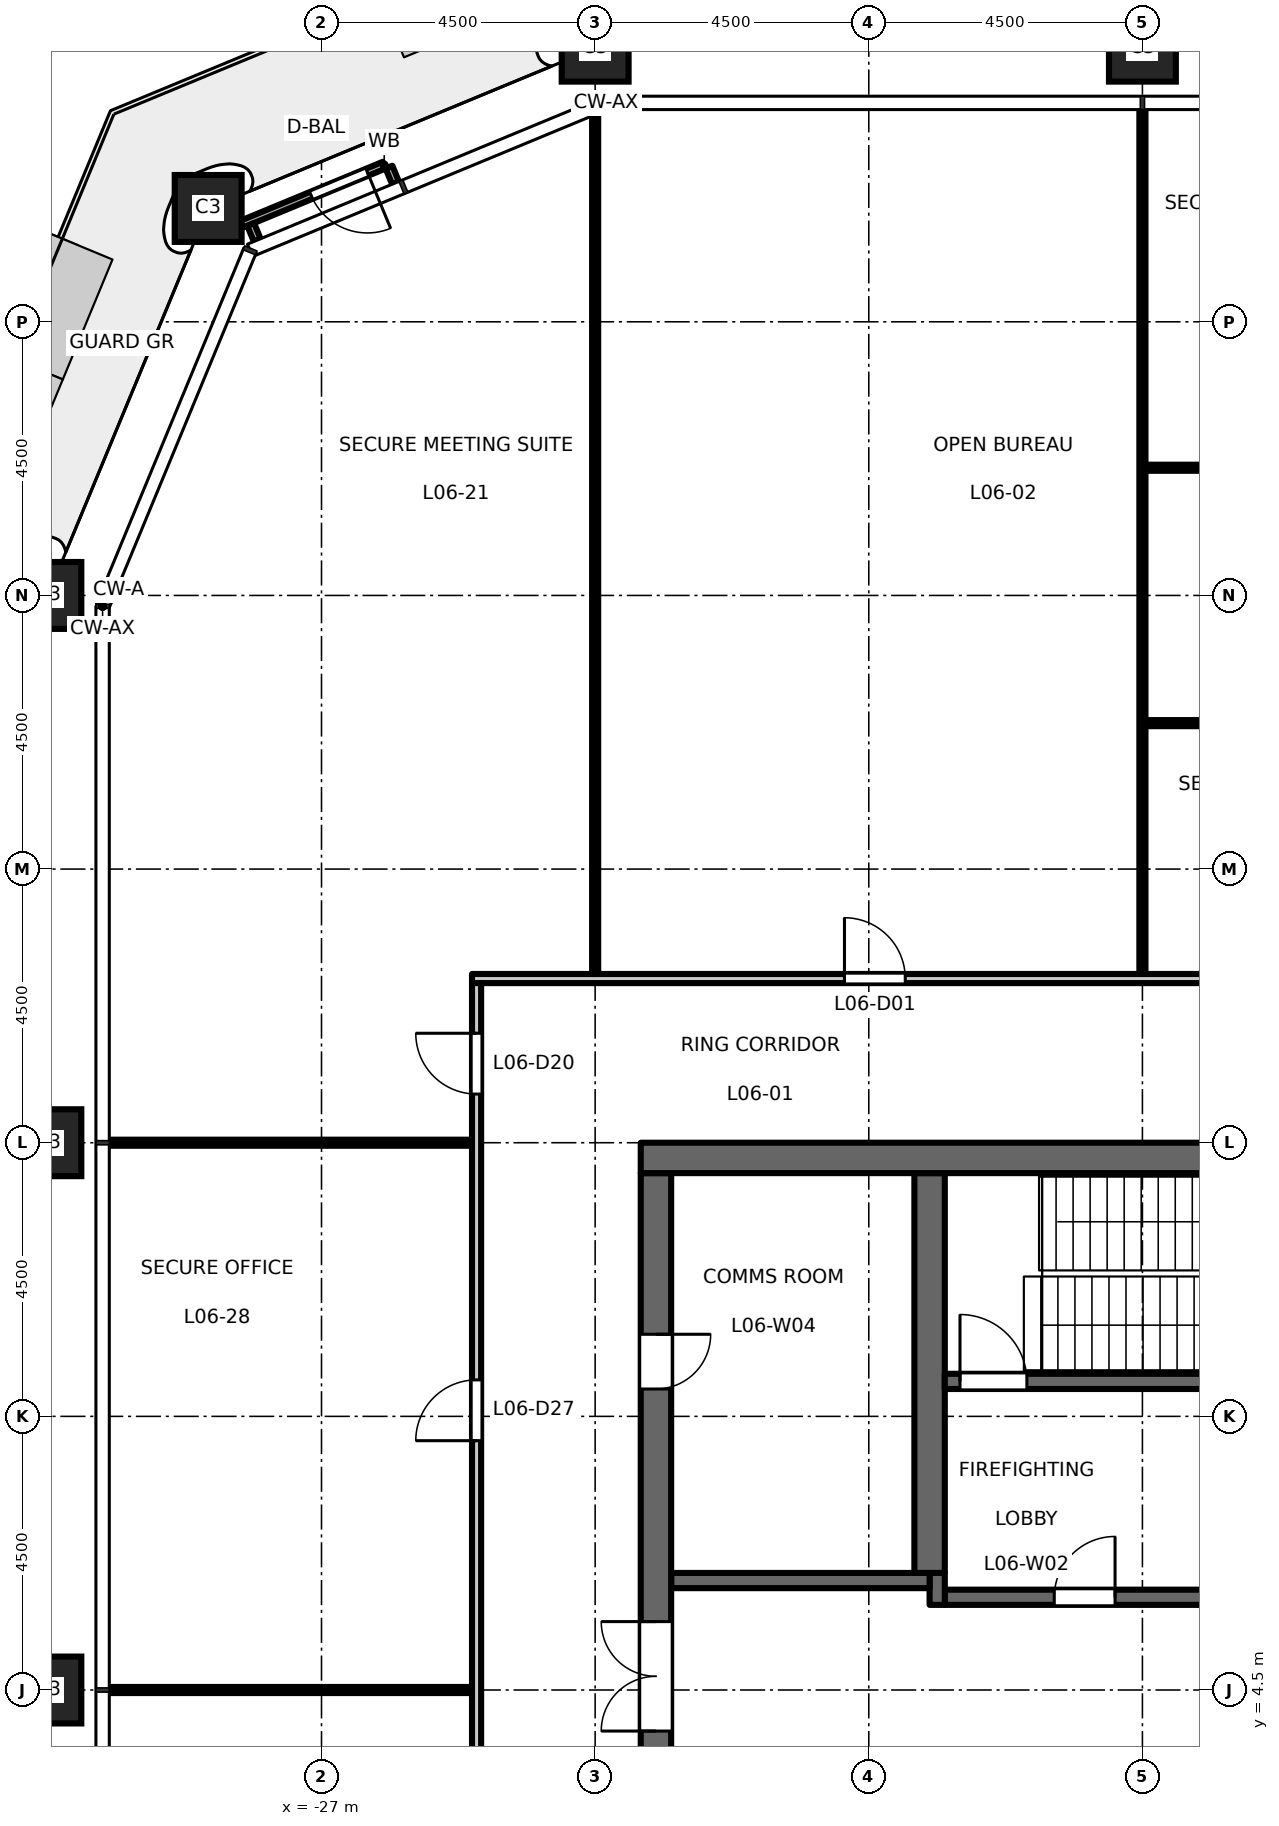
"""IFC4 building model, lengths in metres.
Left out: names, types, materials, properties, quantities, classifications, styles, units other than length and angle.
Written with IfcOpenShell. Run it as: python <this file> out.ifc"""

import sys

from ifc_helpers import new_model, si_unit, direction, frame, frame_2d, origin, origin_2d, place, context, subcontext, project, spatial, rectangle, hollow_rectangle, extrude, element, fill, save


model = new_model("IFC4")
c1 = context("Model", 3, precision=1e-05, world=origin(), true_north=direction((0.0, 1.0)))
c2 = subcontext(c1, "Body", "Model", "MODEL_VIEW")
j1 = project(units=[si_unit("LENGTHUNIT", "METRE"), si_unit("PLANEANGLEUNIT", "RADIAN")], contexts=[c1])
p1 = place(None, origin())
s1 = spatial("IfcSite", under=j1, at=p1, CompositionType="ELEMENT")
p2 = place(p1, origin())
s2 = spatial("IfcBuilding", under=s1, at=p2, CompositionType="ELEMENT")
p3 = place(p2, frame((0.0, 0.0, 31.2)))
s3 = spatial("IfcBuildingStorey", under=s2, at=p3, CompositionType="ELEMENT", Elevation=31.2)
for number, where, z_axis, x_axis in (
    (1, (-13.5, 31.5, 0.0), (0.0, 0.0, 1.0), (1.0, 0.0, 0.0)),
    (2, (-22.5, 31.5, 0.0), (0.0, 0.0, 1.0), (1.0, 0.0, 0.0)),
    (3, (-28.864, 28.864, 0.0), (0.0, 0.0, 1.0), (1.0, 0.0, 0.0)),
    (4, (-31.5, 22.5, 0.0), (0.0, 0.0, 1.0), (1.0, 0.0, 0.0)),
    (5, (-31.5, 13.5, 0.0), (0.0, 0.0, 1.0), (1.0, 0.0, 0.0)),
    (6, (-31.5, 4.5, 0.0), (0.0, 0.0, 1.0), (1.0, 0.0, 0.0)),
):
    element("IfcColumn", number, at=place(p3, frame(where, z_axis=z_axis, x_axis=x_axis)), inside=s3, PredefinedType="COLUMN", context=c2, shape_type="SweptSolid", body=[
        extrude(hollow_rectangle(XDim=1.1, YDim=1.1, WallThickness=0.07, at=origin_2d()), origin(), (0.0, 0.0, 1.0), 4.5),
    ])
p4 = place(p3, frame((-12.15, 6.025, 0.0), z_axis=(0.0, 0.0, 1.0), x_axis=(-1.0, 0.0, 0.0)))
e7 = element("IfcWall", 7, at=p4, inside=s3, PredefinedType="SHEAR", context=c2, shape_type="SweptSolid", body=[
    extrude(rectangle(XDim=4.6, YDim=0.25, at=frame_2d((2.3, 0.0))), origin(), (0.0, 0.0, 1.0), 4.35),
])
p5 = place(p4, frame((1.8, 0.0, 0.0)))
e8 = element("IfcOpeningElement", 8, at=p5, cuts=e7, PredefinedType="OPENING", context=c2, shape_type="SweptSolid", body=[
    extrude(rectangle(XDim=1.0, YDim=2.1, at=frame_2d((0.5, 1.05))), frame((0.0, 0.135, 0.0), z_axis=(0.0, -1.0, 0.0), x_axis=(1.0, 0.0, 0.0)), (0.0, 0.0, 1.0), 0.27),
])
p6 = place(p3, frame((-16.875, 5.9, 0.0), z_axis=(0.0, 0.0, 1.0), x_axis=(0.0, 1.0, 0.0)))
e9 = element("IfcWall", 9, at=p6, inside=s3, PredefinedType="SHEAR", context=c2, shape_type="SweptSolid", body=[
    extrude(rectangle(XDim=0.525, YDim=0.25, at=frame_2d((0.263, 0.0))), origin(), (0.0, 0.0, 1.0), 4.35),
])
p7 = place(p3, frame((-17.0, 6.3, 0.0), z_axis=(0.0, 0.0, 1.0), x_axis=(-1.0, 0.0, 0.0)))
e10 = element("IfcWall", 10, at=p7, inside=s3, PredefinedType="SHEAR", context=c2, shape_type="SweptSolid", body=[
    extrude(rectangle(XDim=4.25, YDim=0.25, at=frame_2d((2.125, 0.0))), origin(), (0.0, 0.0, 1.0), 4.35),
])
p8 = place(p3, frame((-21.5, -13.0, 0.0), z_axis=(0.0, 0.0, 1.0), x_axis=(0.0, 1.0, 0.0)))
e11 = element("IfcWall", 11, at=p8, inside=s3, PredefinedType="SHEAR", context=c2, shape_type="SweptSolid", body=[
    extrude(rectangle(XDim=26.0, YDim=0.5, at=frame_2d((13.0, 0.0))), origin(), (0.0, 0.0, 1.0), 4.35),
])
p9 = place(p8, frame((16.825, 0.0, 0.0)))
e12 = element("IfcOpeningElement", 12, at=p9, cuts=e11, PredefinedType="OPENING", context=c2, shape_type="SweptSolid", body=[
    extrude(rectangle(XDim=1.8, YDim=2.1, at=frame_2d((0.9, 1.05))), frame((0.0, 0.26, 0.0), z_axis=(0.0, -1.0, 0.0), x_axis=(1.0, 0.0, 0.0)), (0.0, 0.0, 1.0), 0.52),
])
p10 = place(p8, frame((7.375, 0.0, 0.0)))
e13 = element("IfcOpeningElement", 13, at=p10, cuts=e11, PredefinedType="OPENING", context=c2, shape_type="SweptSolid", body=[
    extrude(rectangle(XDim=1.8, YDim=2.1, at=frame_2d((0.9, 1.05))), frame((0.0, 0.26, 0.0), z_axis=(0.0, -1.0, 0.0), x_axis=(1.0, 0.0, 0.0)), (0.0, 0.0, 1.0), 0.52),
])
p11 = place(p8, frame((22.45, 0.0, 0.0)))
e14 = element("IfcOpeningElement", 14, at=p11, cuts=e11, PredefinedType="OPENING", context=c2, shape_type="SweptSolid", body=[
    extrude(rectangle(XDim=0.9, YDim=2.1, at=frame_2d((0.45, 1.05))), frame((0.0, 0.26, 0.0), z_axis=(0.0, -1.0, 0.0), x_axis=(1.0, 0.0, 0.0)), (0.0, 0.0, 1.0), 0.52),
])
p12 = place(p8, frame((1.7, 0.0, 0.0)))
e15 = element("IfcOpeningElement", 15, at=p12, cuts=e11, PredefinedType="OPENING", context=c2, shape_type="SweptSolid", body=[
    extrude(rectangle(XDim=0.9, YDim=2.1, at=frame_2d((0.45, 1.05))), frame((0.0, 0.26, 0.0), z_axis=(0.0, -1.0, 0.0), x_axis=(1.0, 0.0, 0.0)), (0.0, 0.0, 1.0), 0.52),
])
p13 = place(p3, frame((-17.0, 6.425, 0.0), z_axis=(0.0, 0.0, 1.0), x_axis=(0.0, 1.0, 0.0)))
e16 = element("IfcWall", 16, at=p13, inside=s3, PredefinedType="SHEAR", context=c2, shape_type="SweptSolid", body=[
    extrude(rectangle(XDim=6.575, YDim=0.5, at=frame_2d((3.288, 0.0))), origin(), (0.0, 0.0, 1.0), 4.35),
])
p14 = place(p3, frame((-8.75, 9.575, 0.0), z_axis=(0.0, 0.0, 1.0), x_axis=(-1.0, 0.0, 0.0)))
e17 = element("IfcWall", 17, at=p14, inside=s3, PredefinedType="SHEAR", context=c2, shape_type="SweptSolid", body=[
    extrude(rectangle(XDim=8.0, YDim=0.25, at=frame_2d((4.0, 0.0))), origin(), (0.0, 0.0, 1.0), 4.35),
])
p15 = place(p14, frame((6.65, 0.0, 0.0)))
e18 = element("IfcOpeningElement", 18, at=p15, cuts=e17, PredefinedType="OPENING", context=c2, shape_type="SweptSolid", body=[
    extrude(rectangle(XDim=1.1, YDim=2.1, at=frame_2d((0.55, 1.05))), frame((0.0, 0.135, 0.0), z_axis=(0.0, -1.0, 0.0), x_axis=(1.0, 0.0, 0.0)), (0.0, 0.0, 1.0), 0.27),
])
p16 = place(p3, frame((-8.25, 13.25, 0.0), z_axis=(0.0, 0.0, 1.0), x_axis=(-1.0, 0.0, 0.0)))
e19 = element("IfcWall", 19, at=p16, inside=s3, PredefinedType="SHEAR", context=c2, shape_type="SweptSolid", body=[
    extrude(rectangle(XDim=13.5, YDim=0.5, at=frame_2d((6.75, 0.0))), origin(), (0.0, 0.0, 1.0), 4.35),
])
p17 = place(p3, frame((-25.783, 29.285, 0.0), z_axis=(0.0, 0.0, 1.0), x_axis=(-0.382942403136, 0.923772220778, 0.0)))
e20 = element("IfcWall", 20, at=p17, inside=s3, PredefinedType="STANDARD", context=c2, shape_type="SweptSolid", body=[
    extrude(rectangle(XDim=0.28, YDim=0.12, at=frame_2d((0.14, 0.0))), origin(), (0.0, 0.0, 1.0), 4.35),
])
p18 = place(p3, frame((-28.058, 28.343, 0.0), z_axis=(0.0, 0.0, 1.0), x_axis=(-0.382634050621, 0.923899985553, 0.0)))
e21 = element("IfcWall", 21, at=p18, inside=s3, PredefinedType="STANDARD", context=c2, shape_type="SweptSolid", body=[
    extrude(rectangle(XDim=0.28, YDim=0.12, at=frame_2d((0.14, 0.0))), origin(), (0.0, 0.0, 1.0), 4.35),
])
p19 = place(p3, frame((-25.969, 29.576, 0.0), z_axis=(0.0, 0.0, 1.0), x_axis=(-0.923897258763, -0.382640634603, 0.0)))
e22 = element("IfcWall", 22, at=p19, inside=s3, PredefinedType="STANDARD", context=c2, shape_type="SweptSolid", body=[
    extrude(rectangle(XDim=2.538, YDim=0.12, at=frame_2d((1.269, 0.0))), origin(), (0.0, 0.0, 1.0), 4.35),
])
p20 = place(p19, frame((0.3, 0.0, 0.0)))
e23 = element("IfcOpeningElement", 23, at=p20, cuts=e22, PredefinedType="OPENING", context=c2, shape_type="SweptSolid", body=[
    extrude(rectangle(XDim=1.0, YDim=2.4, at=frame_2d((0.5, 1.2))), frame((0.0, 0.07, 0.0), z_axis=(0.0, -1.0, 0.0), x_axis=(1.0, 0.0, 0.0)), (0.0, 0.0, 1.0), 0.14),
])
p21 = place(p3, frame((-30.51, 4.5, 0.0), z_axis=(0.0, 0.0, 1.0), x_axis=(1.0, 0.0, 0.0)))
e24 = element("IfcWall", 24, at=p21, inside=s3, PredefinedType="PARTITIONING", context=c2, shape_type="SweptSolid", body=[
    extrude(rectangle(XDim=5.985, YDim=0.1, at=frame_2d((2.993, 0.0))), origin(), (0.0, 0.0, 1.0), 4.35),
])
p22 = place(p3, frame((-30.51, 13.5, 0.0), z_axis=(0.0, 0.0, 1.0), x_axis=(1.0, 0.0, 0.0)))
e25 = element("IfcWall", 25, at=p22, inside=s3, PredefinedType="PARTITIONING", context=c2, shape_type="SweptSolid", body=[
    extrude(rectangle(XDim=5.985, YDim=0.1, at=frame_2d((2.993, 0.0))), origin(), (0.0, 0.0, 1.0), 3.35),
])
p23 = place(p3, frame((-24.525, 16.2, 0.0), z_axis=(0.0, 0.0, 1.0), x_axis=(1.0, 0.0, 0.0)))
e26 = element("IfcWall", 26, at=p23, inside=s3, PredefinedType="PARTITIONING", context=c2, shape_type="SweptSolid", body=[
    extrude(rectangle(XDim=49.05, YDim=0.15, at=frame_2d((24.525, 0.0))), origin(), (0.0, 0.0, 1.0), 4.35),
])
p24 = place(p23, frame((6.125, 0.0, 0.0)))
e27 = element("IfcOpeningElement", 27, at=p24, cuts=e26, PredefinedType="OPENING", context=c2, shape_type="SweptSolid", body=[
    extrude(rectangle(XDim=1.0, YDim=2.1, at=frame_2d((0.5, 1.05))), frame((0.0, 0.085, 0.0), z_axis=(0.0, -1.0, 0.0), x_axis=(1.0, 0.0, 0.0)), (0.0, 0.0, 1.0), 0.17),
])
p25 = place(p23, frame((15.125, 0.0, 0.0)))
e28 = element("IfcOpeningElement", 28, at=p25, cuts=e26, PredefinedType="OPENING", context=c2, shape_type="SweptSolid", body=[
    extrude(rectangle(XDim=1.0, YDim=2.1, at=frame_2d((0.5, 1.05))), frame((0.0, 0.085, 0.0), z_axis=(0.0, -1.0, 0.0), x_axis=(1.0, 0.0, 0.0)), (0.0, 0.0, 1.0), 0.17),
])
p26 = place(p23, frame((24.125, 0.0, 0.0)))
e29 = element("IfcOpeningElement", 29, at=p26, cuts=e26, PredefinedType="OPENING", context=c2, shape_type="SweptSolid", body=[
    extrude(rectangle(XDim=1.0, YDim=2.1, at=frame_2d((0.5, 1.05))), frame((0.0, 0.085, 0.0), z_axis=(0.0, -1.0, 0.0), x_axis=(1.0, 0.0, 0.0)), (0.0, 0.0, 1.0), 0.17),
])
p27 = place(p23, frame((33.125, 0.0, 0.0)))
e30 = element("IfcOpeningElement", 30, at=p27, cuts=e26, PredefinedType="OPENING", context=c2, shape_type="SweptSolid", body=[
    extrude(rectangle(XDim=1.0, YDim=2.1, at=frame_2d((0.5, 1.05))), frame((0.0, 0.085, 0.0), z_axis=(0.0, -1.0, 0.0), x_axis=(1.0, 0.0, 0.0)), (0.0, 0.0, 1.0), 0.17),
])
p28 = place(p23, frame((42.125, 0.0, 0.0)))
e31 = element("IfcOpeningElement", 31, at=p28, cuts=e26, PredefinedType="OPENING", context=c2, shape_type="SweptSolid", body=[
    extrude(rectangle(XDim=1.0, YDim=2.1, at=frame_2d((0.5, 1.05))), frame((0.0, 0.085, 0.0), z_axis=(0.0, -1.0, 0.0), x_axis=(1.0, 0.0, 0.0)), (0.0, 0.0, 1.0), 0.17),
])
p29 = place(p3, frame((-13.45, 20.4, 0.0), z_axis=(0.0, 0.0, 1.0), x_axis=(1.0, 0.0, 0.0)))
e32 = element("IfcWall", 32, at=p29, inside=s3, PredefinedType="PARTITIONING", context=c2, shape_type="SweptSolid", body=[
    extrude(rectangle(XDim=8.9, YDim=0.1, at=frame_2d((4.45, 0.0))), origin(), (0.0, 0.0, 1.0), 4.35),
])
p30 = place(p29, frame((4.05, 0.0, 0.0)))
e33 = element("IfcOpeningElement", 33, at=p30, cuts=e32, PredefinedType="OPENING", context=c2, shape_type="SweptSolid", body=[
    extrude(rectangle(XDim=1.0, YDim=2.1, at=frame_2d((0.5, 1.05))), frame((0.0, 0.06, 0.0), z_axis=(0.0, -1.0, 0.0), x_axis=(1.0, 0.0, 0.0)), (0.0, 0.0, 1.0), 0.12),
])
p31 = place(p3, frame((-13.45, 24.6, 0.0), z_axis=(0.0, 0.0, 1.0), x_axis=(1.0, 0.0, 0.0)))
e34 = element("IfcWall", 34, at=p31, inside=s3, PredefinedType="PARTITIONING", context=c2, shape_type="SweptSolid", body=[
    extrude(rectangle(XDim=8.9, YDim=0.1, at=frame_2d((4.45, 0.0))), origin(), (0.0, 0.0, 1.0), 4.35),
])
p32 = place(p31, frame((4.05, 0.0, 0.0)))
e35 = element("IfcOpeningElement", 35, at=p32, cuts=e34, PredefinedType="OPENING", context=c2, shape_type="SweptSolid", body=[
    extrude(rectangle(XDim=1.0, YDim=2.1, at=frame_2d((0.5, 1.05))), frame((0.0, 0.06, 0.0), z_axis=(0.0, -1.0, 0.0), x_axis=(1.0, 0.0, 0.0)), (0.0, 0.0, 1.0), 0.12),
])
p33 = place(p3, frame((-24.45, -16.125, 0.0), z_axis=(0.0, 0.0, 1.0), x_axis=(0.0, 1.0, 0.0)))
e36 = element("IfcWall", 36, at=p33, inside=s3, PredefinedType="PARTITIONING", context=c2, shape_type="SweptSolid", body=[
    extrude(rectangle(XDim=32.25, YDim=0.15, at=frame_2d((16.125, 0.0))), origin(), (0.0, 0.0, 1.0), 4.35),
])
p34 = place(p33, frame((30.425, 0.0, 0.0)))
e37 = element("IfcOpeningElement", 37, at=p34, cuts=e36, PredefinedType="OPENING", context=c2, shape_type="SweptSolid", body=[
    extrude(rectangle(XDim=1.0, YDim=2.1, at=frame_2d((0.5, 1.05))), frame((0.0, 0.085, 0.0), z_axis=(0.0, -1.0, 0.0), x_axis=(1.0, 0.0, 0.0)), (0.0, 0.0, 1.0), 0.17),
])
p35 = place(p33, frame((0.725, 0.0, 0.0)))
e38 = element("IfcOpeningElement", 38, at=p35, cuts=e36, PredefinedType="OPENING", context=c2, shape_type="SweptSolid", body=[
    extrude(rectangle(XDim=1.0, YDim=2.1, at=frame_2d((0.5, 1.05))), frame((0.0, 0.085, 0.0), z_axis=(0.0, -1.0, 0.0), x_axis=(1.0, 0.0, 0.0)), (0.0, 0.0, 1.0), 0.17),
])
p36 = place(p33, frame((6.725, 0.0, 0.0)))
e39 = element("IfcOpeningElement", 39, at=p36, cuts=e36, PredefinedType="OPENING", context=c2, shape_type="SweptSolid", body=[
    extrude(rectangle(XDim=1.0, YDim=2.1, at=frame_2d((0.5, 1.05))), frame((0.0, 0.085, 0.0), z_axis=(0.0, -1.0, 0.0), x_axis=(1.0, 0.0, 0.0)), (0.0, 0.0, 1.0), 0.17),
])
p37 = place(p33, frame((15.725, 0.0, 0.0)))
e40 = element("IfcOpeningElement", 40, at=p37, cuts=e36, PredefinedType="OPENING", context=c2, shape_type="SweptSolid", body=[
    extrude(rectangle(XDim=1.0, YDim=2.1, at=frame_2d((0.5, 1.05))), frame((0.0, 0.085, 0.0), z_axis=(0.0, -1.0, 0.0), x_axis=(1.0, 0.0, 0.0)), (0.0, 0.0, 1.0), 0.17),
])
p38 = place(p33, frame((24.725, 0.0, 0.0)))
e41 = element("IfcOpeningElement", 41, at=p38, cuts=e36, PredefinedType="OPENING", context=c2, shape_type="SweptSolid", body=[
    extrude(rectangle(XDim=1.0, YDim=2.1, at=frame_2d((0.5, 1.05))), frame((0.0, 0.085, 0.0), z_axis=(0.0, -1.0, 0.0), x_axis=(1.0, 0.0, 0.0)), (0.0, 0.0, 1.0), 0.17),
])
p39 = place(p3, frame((-22.5, 16.275, 0.0), z_axis=(0.0, 0.0, 1.0), x_axis=(0.0, 1.0, 0.0)))
e42 = element("IfcWall", 42, at=p39, inside=s3, PredefinedType="PARTITIONING", context=c2, shape_type="SweptSolid", body=[
    extrude(rectangle(XDim=14.153, YDim=0.1, at=frame_2d((7.077, 0.0))), origin(), (0.0, 0.0, 1.0), 3.35),
])
p40 = place(p3, frame((-13.5, 16.275, 0.0), z_axis=(0.0, 0.0, 1.0), x_axis=(0.0, 1.0, 0.0)))
e43 = element("IfcWall", 43, at=p40, inside=s3, PredefinedType="PARTITIONING", context=c2, shape_type="SweptSolid", body=[
    extrude(rectangle(XDim=14.235, YDim=0.1, at=frame_2d((7.118, 0.0))), origin(), (0.0, 0.0, 1.0), 3.35),
])
p41 = place(p5, origin())
e44 = element("IfcDoor", 44, at=p41, inside=s3, OperationType="SINGLE_SWING_LEFT", PredefinedType="DOOR", context=c2, shape_type="SweptSolid", body=[
    extrude(rectangle(XDim=1.0, YDim=2.1, at=frame_2d((0.5, 1.05))), frame((0.0, 0.025, 0.0), z_axis=(0.0, -1.0, 0.0), x_axis=(1.0, 0.0, 0.0)), (0.0, 0.0, 1.0), 0.05),
])
fill(e8, e44)
p42 = place(p15, origin())
e45 = element("IfcDoor", 45, at=p42, inside=s3, OperationType="SINGLE_SWING_RIGHT", PredefinedType="DOOR", context=c2, shape_type="SweptSolid", body=[
    extrude(rectangle(XDim=1.1, YDim=2.1, at=frame_2d((0.55, 1.05))), frame((0.0, 0.025, 0.0), z_axis=(0.0, -1.0, 0.0), x_axis=(1.0, 0.0, 0.0)), (0.0, 0.0, 1.0), 0.05),
])
fill(e18, e45)
p43 = place(p9, origin())
e46 = element("IfcDoor", 46, at=p43, inside=s3, OperationType="DOUBLE_DOOR_DOUBLE_SWING", PredefinedType="DOOR", context=c2, shape_type="SweptSolid", body=[
    extrude(rectangle(XDim=1.8, YDim=2.1, at=frame_2d((0.9, 1.05))), frame((0.0, 0.025, 0.0), z_axis=(0.0, -1.0, 0.0), x_axis=(1.0, 0.0, 0.0)), (0.0, 0.0, 1.0), 0.05),
])
fill(e12, e46)
p44 = place(p11, origin())
e47 = element("IfcDoor", 47, at=p44, inside=s3, OperationType="SINGLE_SWING_RIGHT", PredefinedType="DOOR", context=c2, shape_type="SweptSolid", body=[
    extrude(rectangle(XDim=0.9, YDim=2.1, at=frame_2d((0.45, 1.05))), frame((0.0, 0.025, 0.0), z_axis=(0.0, -1.0, 0.0), x_axis=(1.0, 0.0, 0.0)), (0.0, 0.0, 1.0), 0.05),
])
fill(e14, e47)
p45 = place(p20, origin())
e48 = element("IfcDoor", 48, at=p45, inside=s3, OperationType="SINGLE_SWING_LEFT", PredefinedType="DOOR", context=c2, shape_type="SweptSolid", body=[
    extrude(rectangle(XDim=1.0, YDim=2.4, at=frame_2d((0.5, 1.2))), frame((0.0, 0.025, 0.0), z_axis=(0.0, -1.0, 0.0), x_axis=(1.0, 0.0, 0.0)), (0.0, 0.0, 1.0), 0.05),
])
fill(e23, e48)
p46 = place(p24, origin())
e49 = element("IfcDoor", 49, at=p46, inside=s3, OperationType="SINGLE_SWING_LEFT", PredefinedType="DOOR", context=c2, shape_type="SweptSolid", body=[
    extrude(rectangle(XDim=1.0, YDim=2.1, at=frame_2d((0.5, 1.05))), frame((0.0, 0.025, 0.0), z_axis=(0.0, -1.0, 0.0), x_axis=(1.0, 0.0, 0.0)), (0.0, 0.0, 1.0), 0.05),
])
fill(e27, e49)
p47 = place(p34, origin())
e50 = element("IfcDoor", 50, at=p47, inside=s3, OperationType="SINGLE_SWING_RIGHT", PredefinedType="DOOR", context=c2, shape_type="SweptSolid", body=[
    extrude(rectangle(XDim=1.0, YDim=2.1, at=frame_2d((0.5, 1.05))), frame((0.0, 0.025, 0.0), z_axis=(0.0, -1.0, 0.0), x_axis=(1.0, 0.0, 0.0)), (0.0, 0.0, 1.0), 0.05),
])
fill(e37, e50)
p48 = place(p38, origin())
e51 = element("IfcDoor", 51, at=p48, inside=s3, OperationType="SINGLE_SWING_LEFT", PredefinedType="DOOR", context=c2, shape_type="SweptSolid", body=[
    extrude(rectangle(XDim=1.0, YDim=2.1, at=frame_2d((0.5, 1.05))), frame((0.0, 0.025, 0.0), z_axis=(0.0, -1.0, 0.0), x_axis=(1.0, 0.0, 0.0)), (0.0, 0.0, 1.0), 0.05),
])
fill(e41, e51)
save(model, sys.argv[1])
